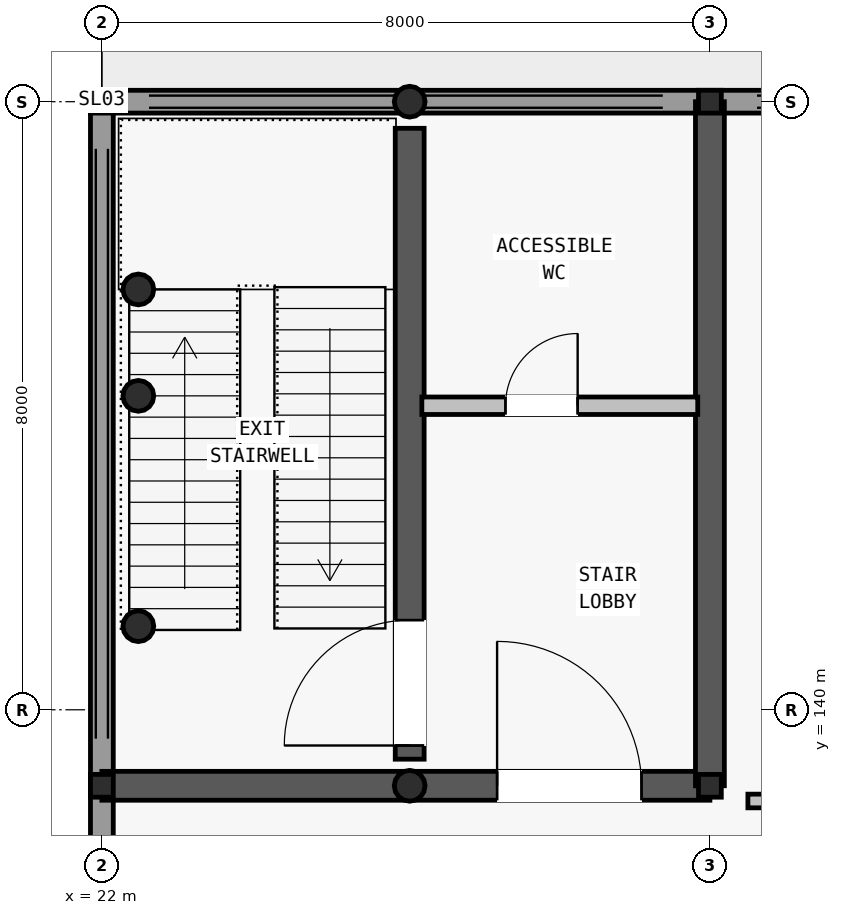
"""IFC4 building model, lengths in metres.
Left out: names, types, materials, properties, quantities, classifications, styles, units other than length and angle.
Written with IfcOpenShell. Run it as: python <this file> out.ifc"""

import sys

from ifc_helpers import new_model, si_unit, direction, frame, frame_2d, origin, origin_2d, place, context, subcontext, project, spatial, rectangle, hollow_circle, i_section, extrude, element, fill, save


model = new_model("IFC4")
c1 = context("Model", 3, precision=1e-05, world=origin(), true_north=direction((0.0, 1.0)))
c2 = subcontext(c1, "Body", "Model", "MODEL_VIEW")
j1 = project(units=[si_unit("LENGTHUNIT", "METRE"), si_unit("PLANEANGLEUNIT", "RADIAN")], contexts=[c1])
p1 = place(None, origin())
s1 = spatial("IfcSite", under=j1, at=p1, CompositionType="ELEMENT")
p2 = place(p1, origin())
s2 = spatial("IfcBuilding", under=s1, at=p2, CompositionType="ELEMENT")
p3 = place(p2, origin())
s3 = spatial("IfcBuildingStorey", under=s2, at=p3, CompositionType="ELEMENT", Elevation=0.0)
for number, where, z_axis, x_axis in (
    (1, (22.0, 148.0, -0.9), (0.0, 0.0, 1.0), (1.0, 0.0, 0.0)),
    (2, (30.0, 148.0, -0.9), (0.0, 0.0, 1.0), (1.0, 0.0, 0.0)),
    (3, (22.0, 139.0, -0.9), (0.0, 0.0, 1.0), (1.0, 0.0, 0.0)),
    (4, (30.0, 139.0, -0.9), (0.0, 0.0, 1.0), (1.0, 0.0, 0.0)),
):
    element("IfcColumn", number, at=place(p3, frame(where, z_axis=z_axis, x_axis=x_axis)), inside=s3, PredefinedType="COLUMN", context=c2, shape_type="SweptSolid", body=[
        extrude(i_section(OverallWidth=0.3, OverallDepth=0.3, WebThickness=0.01, FlangeThickness=0.015, FilletRadius=0.018, at=origin_2d()), origin(), (0.0, 0.0, 1.0), 6.5),
    ])
for number, where, z_axis, x_axis in (
    (5, (26.05, 139.0, -0.9), (0.0, 0.0, 1.0), (1.0, 0.0, 0.0)),
    (6, (26.05, 148.0, -0.9), (0.0, 0.0, 1.0), (1.0, 0.0, 0.0)),
    (7, (22.48, 141.1, -0.9), (0.0, 0.0, 1.0), (1.0, 0.0, 0.0)),
    (8, (22.48, 144.13, -0.9), (0.0, 0.0, 1.0), (1.0, 0.0, 0.0)),
):
    element("IfcColumn", number, at=place(p3, frame(where, z_axis=z_axis, x_axis=x_axis)), inside=s3, PredefinedType="COLUMN", context=c2, shape_type="SweptSolid", body=[
        extrude(hollow_circle(Radius=0.203, WallThickness=0.014, at=origin_2d()), origin(), (0.0, 0.0, 1.0), 6.5),
    ])
p4 = place(p3, frame((22.0, 148.0, -0.9), z_axis=(0.0, 0.0, 1.0), x_axis=(1.0, 0.0, 0.0)))
e9 = element("IfcWall", 9, at=p4, inside=s3, PredefinedType="STANDARD", context=c2, shape_type="SweptSolid", body=[
    extrude(rectangle(XDim=188.0, YDim=0.3, at=frame_2d((94.0, 0.0))), origin(), (0.0, 0.0, 1.0), 0.9),
])
p5 = place(p3, frame((22.0, 113.0, -0.9), z_axis=(0.0, 0.0, 1.0), x_axis=(0.0, 1.0, 0.0)))
e10 = element("IfcWall", 10, at=p5, inside=s3, PredefinedType="STANDARD", context=c2, shape_type="SweptSolid", body=[
    extrude(rectangle(XDim=35.0, YDim=0.3, at=frame_2d((17.5, 0.0))), origin(), (0.0, 0.0, 1.0), 0.9),
])
p6 = place(p3, frame((22.0, 139.0, -0.9), z_axis=(0.0, 0.0, 1.0), x_axis=(1.0, 0.0, 0.0)))
e11 = element("IfcWall", 11, at=p6, inside=s3, PredefinedType="SHEAR", context=c2, shape_type="SweptSolid", body=[
    extrude(rectangle(XDim=8.0, YDim=0.38, at=frame_2d((4.0, 0.0))), origin(), (0.0, 0.0, 1.0), 6.22),
])
p7 = place(p6, frame((5.2, 0.0, 0.9)))
e12 = element("IfcOpeningElement", 12, at=p7, cuts=e11, PredefinedType="OPENING", context=c2, shape_type="SweptSolid", body=[
    extrude(rectangle(XDim=1.9, YDim=2.3, at=frame_2d((0.95, 1.15))), frame((0.0, 0.2, 0.0), z_axis=(0.0, -1.0, 0.0), x_axis=(1.0, 0.0, 0.0)), (0.0, 0.0, 1.0), 0.4),
])
p8 = place(p3, frame((30.0, 139.0, -0.9), z_axis=(0.0, 0.0, 1.0), x_axis=(0.0, 1.0, 0.0)))
e13 = element("IfcWall", 13, at=p8, inside=s3, PredefinedType="SHEAR", context=c2, shape_type="SweptSolid", body=[
    extrude(rectangle(XDim=9.0, YDim=0.38, at=frame_2d((4.5, 0.0))), origin(), (0.0, 0.0, 1.0), 6.22),
])
p9 = place(p3, frame((26.05, 139.35, -0.9), z_axis=(0.0, 0.0, 1.0), x_axis=(0.0, 1.0, 0.0)))
e14 = element("IfcWall", 14, at=p9, inside=s3, PredefinedType="SHEAR", context=c2, shape_type="SweptSolid", body=[
    extrude(rectangle(XDim=8.3, YDim=0.38, at=frame_2d((4.15, 0.0))), origin(), (0.0, 0.0, 1.0), 6.22),
])
p10 = place(p9, frame((0.18, 0.0, 0.9)))
e15 = element("IfcOpeningElement", 15, at=p10, cuts=e14, PredefinedType="OPENING", context=c2, shape_type="SweptSolid", body=[
    extrude(rectangle(XDim=1.65, YDim=2.2, at=frame_2d((0.825, 1.1))), frame((0.0, 0.2, 0.0), z_axis=(0.0, -1.0, 0.0), x_axis=(1.0, 0.0, 0.0)), (0.0, 0.0, 1.0), 0.4),
])
p11 = place(p3, frame((26.21, 144.0, 0.0), z_axis=(0.0, 0.0, 1.0), x_axis=(1.0, 0.0, 0.0)))
e16 = element("IfcWall", 16, at=p11, inside=s3, PredefinedType="PARTITIONING", context=c2, shape_type="SweptSolid", body=[
    extrude(rectangle(XDim=3.63, YDim=0.23, at=frame_2d((1.815, 0.0))), origin(), (0.0, 0.0, 1.0), 4.2),
])
p12 = place(p11, frame((1.1, 0.0, 0.0)))
e17 = element("IfcOpeningElement", 17, at=p12, cuts=e16, PredefinedType="OPENING", context=c2, shape_type="SweptSolid", body=[
    extrude(rectangle(XDim=0.95, YDim=2.1, at=frame_2d((0.475, 1.05))), frame((0.0, 0.125, 0.0), z_axis=(0.0, -1.0, 0.0), x_axis=(1.0, 0.0, 0.0)), (0.0, 0.0, 1.0), 0.25),
])
p13 = place(p3, frame((22.48, 145.53, -0.9), z_axis=(0.0, 0.0, 1.0), x_axis=(1.0, 0.0, 0.0)))
e18 = element("IfcColumn", 18, at=p13, inside=s3, PredefinedType="COLUMN", context=c2, shape_type="SweptSolid", body=[
    extrude(hollow_circle(Radius=0.203, WallThickness=0.014, at=origin_2d()), origin(), (0.0, 0.0, 1.0), 3.49),
])
p14 = place(p3, frame((30.5, 138.8, 0.0), z_axis=(0.0, 0.0, 1.0), x_axis=(1.0, 0.0, 0.0)))
e19 = element("IfcWall", 19, at=p14, inside=s3, PredefinedType="PARTITIONING", context=c2, shape_type="SweptSolid", body=[
    extrude(rectangle(XDim=47.0, YDim=0.18, at=frame_2d((23.5, 0.0))), origin(), (0.0, 0.0, 1.0), 4.2),
])
p15 = place(p14, frame((11.5, 0.0, 0.0)))
e20 = element("IfcOpeningElement", 20, at=p15, cuts=e19, PredefinedType="OPENING", context=c2, shape_type="SweptSolid", body=[
    extrude(rectangle(XDim=1.15, YDim=2.15, at=frame_2d((0.575, 1.075))), frame((0.0, 0.1, 0.0), z_axis=(0.0, -1.0, 0.0), x_axis=(1.0, 0.0, 0.0)), (0.0, 0.0, 1.0), 0.2),
])
p16 = place(p7, origin())
e21 = element("IfcDoor", 21, at=p16, inside=s3, OperationType="SINGLE_SWING_LEFT", PredefinedType="DOOR", context=c2, shape_type="SweptSolid", body=[
    extrude(rectangle(XDim=1.9, YDim=2.3, at=frame_2d((0.95, 1.15))), frame((0.0, 0.025, 0.0), z_axis=(0.0, -1.0, 0.0), x_axis=(1.0, 0.0, 0.0)), (0.0, 0.0, 1.0), 0.05),
])
fill(e12, e21)
p17 = place(p10, origin())
e22 = element("IfcDoor", 22, at=p17, inside=s3, OperationType="SINGLE_SWING_LEFT", PredefinedType="DOOR", context=c2, shape_type="SweptSolid", body=[
    extrude(rectangle(XDim=1.65, YDim=2.2, at=frame_2d((0.825, 1.1))), frame((0.0, 0.025, 0.0), z_axis=(0.0, -1.0, 0.0), x_axis=(1.0, 0.0, 0.0)), (0.0, 0.0, 1.0), 0.05),
])
fill(e15, e22)
p18 = place(p12, origin())
e23 = element("IfcDoor", 23, at=p18, inside=s3, OperationType="SINGLE_SWING_RIGHT", PredefinedType="DOOR", context=c2, shape_type="SweptSolid", body=[
    extrude(rectangle(XDim=0.95, YDim=2.1, at=frame_2d((0.475, 1.05))), frame((0.0, 0.025, 0.0), z_axis=(0.0, -1.0, 0.0), x_axis=(1.0, 0.0, 0.0)), (0.0, 0.0, 1.0), 0.05),
])
fill(e17, e23)
save(model, sys.argv[1])
